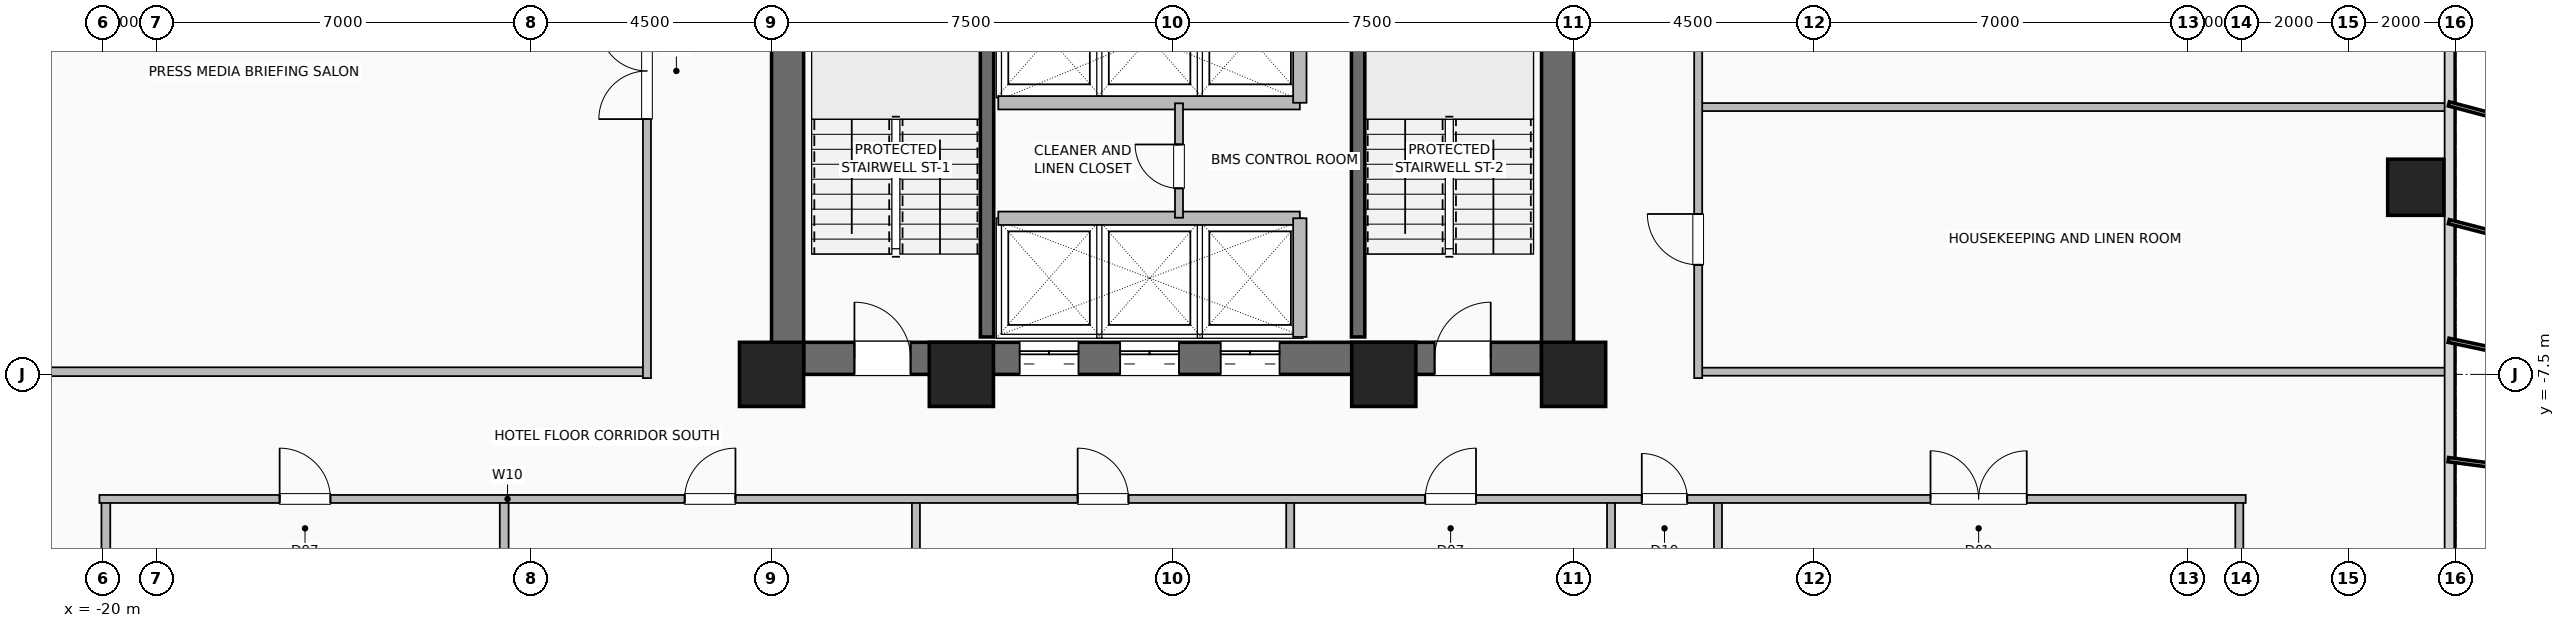
"""IFC4 building model, lengths in metres.
Left out: names, types, materials, properties, quantities, classifications, styles, units other than length and angle.
Written with IfcOpenShell. Run it as: python <this file> out.ifc"""

import sys

from ifc_helpers import new_model, si_unit, direction, frame, frame_2d, origin, origin_2d, place, context, subcontext, project, spatial, rectangle, hollow_rectangle, extrude, element, fill, save


model = new_model("IFC4")
c1 = context("Model", 3, precision=1e-05, world=origin(), true_north=direction((0.0, 1.0)))
c2 = subcontext(c1, "Body", "Model", "MODEL_VIEW")
j1 = project(units=[si_unit("LENGTHUNIT", "METRE"), si_unit("PLANEANGLEUNIT", "RADIAN")], contexts=[c1])
p1 = place(None, origin())
s1 = spatial("IfcSite", under=j1, at=p1, CompositionType="ELEMENT")
p2 = place(p1, origin())
s2 = spatial("IfcBuilding", under=s1, at=p2, CompositionType="ELEMENT")
p3 = place(p2, frame((0.0, 0.0, 37.5)))
s3 = spatial("IfcBuildingStorey", under=s2, at=p3, CompositionType="ELEMENT", Elevation=37.5)
for number, where, z_axis, x_axis in (
    (1, (-7.5, -7.5, 0.0), (0.0, 0.0, 1.0), (1.0, 0.0, 0.0)),
    (2, (-3.95, -7.5, 0.0), (0.0, 0.0, 1.0), (1.0, 0.0, 0.0)),
    (3, (3.95, -7.5, 0.0), (0.0, 0.0, 1.0), (1.0, 0.0, 0.0)),
    (4, (7.5, -7.5, 0.0), (0.0, 0.0, 1.0), (1.0, 0.0, 0.0)),
):
    element("IfcColumn", number, at=place(p3, frame(where, z_axis=z_axis, x_axis=x_axis)), inside=s3, PredefinedType="COLUMN", context=c2, shape_type="SweptSolid", body=[
        extrude(hollow_rectangle(XDim=1.2, YDim=1.2, WallThickness=0.055, at=origin_2d()), origin(), (0.0, 0.0, 1.0), 3.5),
    ])
p4 = place(p3, frame((23.25, -4.0, 0.0), z_axis=(0.0, 0.0, 1.0), x_axis=(1.0, 0.0, 0.0)))
e5 = element("IfcColumn", 5, at=p4, inside=s3, PredefinedType="COLUMN", context=c2, shape_type="SweptSolid", body=[
    extrude(hollow_rectangle(XDim=1.05, YDim=1.05, WallThickness=0.05, at=origin_2d()), origin(), (0.0, 0.0, 1.0), 3.5),
])
p5 = place(p3, frame((-7.5, -7.2, 0.0), z_axis=(0.0, 0.0, 1.0), x_axis=(1.0, 0.0, 0.0)))
e6 = element("IfcWall", 6, at=p5, inside=s3, PredefinedType="SHEAR", context=c2, shape_type="SweptSolid", body=[
    extrude(rectangle(XDim=15.0, YDim=0.6, at=frame_2d((7.5, 0.0))), origin(), (0.0, 0.0, 1.0), 3.25),
])
p6 = place(p5, frame((1.55, 0.0, 0.0)))
e7 = element("IfcOpeningElement", 7, at=p6, cuts=e6, PredefinedType="OPENING", context=c2, shape_type="SweptSolid", body=[
    extrude(rectangle(XDim=1.05, YDim=2.08, at=frame_2d((0.525, 1.04))), frame((0.0, 0.31, 0.0), z_axis=(0.0, -1.0, 0.0), x_axis=(1.0, 0.0, 0.0)), (0.0, 0.0, 1.0), 0.62),
])
p7 = place(p5, frame((12.4, 0.0, 0.0)))
e8 = element("IfcOpeningElement", 8, at=p7, cuts=e6, PredefinedType="OPENING", context=c2, shape_type="SweptSolid", body=[
    extrude(rectangle(XDim=1.05, YDim=2.08, at=frame_2d((0.525, 1.04))), frame((0.0, 0.31, 0.0), z_axis=(0.0, -1.0, 0.0), x_axis=(1.0, 0.0, 0.0)), (0.0, 0.0, 1.0), 0.62),
])
p8 = place(p5, frame((4.64, 0.0, 0.0)))
e9 = element("IfcOpeningElement", 9, at=p8, cuts=e6, PredefinedType="OPENING", context=c2, shape_type="SweptSolid", body=[
    extrude(rectangle(XDim=1.1, YDim=2.2, at=frame_2d((0.55, 1.1))), frame((0.0, 0.31, 0.0), z_axis=(0.0, -1.0, 0.0), x_axis=(1.0, 0.0, 0.0)), (0.0, 0.0, 1.0), 0.62),
])
p9 = place(p5, frame((6.52, 0.0, 0.0)))
e10 = element("IfcOpeningElement", 10, at=p9, cuts=e6, PredefinedType="OPENING", context=c2, shape_type="SweptSolid", body=[
    extrude(rectangle(XDim=1.1, YDim=2.2, at=frame_2d((0.55, 1.1))), frame((0.0, 0.31, 0.0), z_axis=(0.0, -1.0, 0.0), x_axis=(1.0, 0.0, 0.0)), (0.0, 0.0, 1.0), 0.62),
])
p10 = place(p5, frame((8.4, 0.0, 0.0)))
e11 = element("IfcOpeningElement", 11, at=p10, cuts=e6, PredefinedType="OPENING", context=c2, shape_type="SweptSolid", body=[
    extrude(rectangle(XDim=1.1, YDim=2.2, at=frame_2d((0.55, 1.1))), frame((0.0, 0.31, 0.0), z_axis=(0.0, -1.0, 0.0), x_axis=(1.0, 0.0, 0.0)), (0.0, 0.0, 1.0), 0.62),
])
p11 = place(p3, frame((-7.2, -7.5, 0.0), z_axis=(0.0, 0.0, 1.0), x_axis=(0.0, 1.0, 0.0)))
e12 = element("IfcWall", 12, at=p11, inside=s3, PredefinedType="SHEAR", context=c2, shape_type="SweptSolid", body=[
    extrude(rectangle(XDim=15.0, YDim=0.6, at=frame_2d((7.5, 0.0))), origin(), (0.0, 0.0, 1.0), 3.25),
])
p12 = place(p11, frame((9.5, 0.0, 0.0)))
e13 = element("IfcOpeningElement", 13, at=p12, cuts=e12, PredefinedType="OPENING", context=c2, shape_type="SweptSolid", body=[
    extrude(rectangle(XDim=1.0, YDim=2.08, at=frame_2d((0.5, 1.04))), frame((0.0, 0.31, 0.0), z_axis=(0.0, -1.0, 0.0), x_axis=(1.0, 0.0, 0.0)), (0.0, 0.0, 1.0), 0.62),
])
p13 = place(p3, frame((7.2, -7.5, 0.0), z_axis=(0.0, 0.0, 1.0), x_axis=(0.0, 1.0, 0.0)))
e14 = element("IfcWall", 14, at=p13, inside=s3, PredefinedType="SHEAR", context=c2, shape_type="SweptSolid", body=[
    extrude(rectangle(XDim=15.0, YDim=0.6, at=frame_2d((7.5, 0.0))), origin(), (0.0, 0.0, 1.0), 3.25),
])
for number, where, z_axis, x_axis in (
    (15, (-3.47, -6.8, 0.0), (0.0, 0.0, 1.0), (0.0, 1.0, 0.0)),
    (16, (3.47, -6.8, 0.0), (0.0, 0.0, 1.0), (0.0, 1.0, 0.0)),
):
    element("IfcWall", number, at=place(p3, frame(where, z_axis=z_axis, x_axis=x_axis)), inside=s3, PredefinedType="SHEAR", context=c2, shape_type="SweptSolid", body=[
        extrude(rectangle(XDim=7.72, YDim=0.25, at=frame_2d((3.86, 0.0))), origin(), (0.0, 0.0, 1.0), 3.25),
    ])
p14 = place(p3, frame((-3.26, -4.58, 0.0), z_axis=(0.0, 0.0, 1.0), x_axis=(1.0, 0.0, 0.0)))
e17 = element("IfcWall", 17, at=p14, inside=s3, PredefinedType="SHEAR", context=c2, shape_type="SweptSolid", body=[
    extrude(rectangle(XDim=5.64, YDim=0.25, at=frame_2d((2.82, 0.0))), origin(), (0.0, 0.0, 1.0), 3.25),
])
p15 = place(p3, frame((2.38, -6.8, 0.0), z_axis=(0.0, 0.0, 1.0), x_axis=(0.0, 1.0, 0.0)))
e18 = element("IfcWall", 18, at=p15, inside=s3, PredefinedType="SHEAR", context=c2, shape_type="SweptSolid", body=[
    extrude(rectangle(XDim=2.22, YDim=0.25, at=frame_2d((1.11, 0.0))), origin(), (0.0, 0.0, 1.0), 3.25),
])
p16 = place(p3, frame((-3.26, -2.42, 0.0), z_axis=(0.0, 0.0, 1.0), x_axis=(1.0, 0.0, 0.0)))
e19 = element("IfcWall", 19, at=p16, inside=s3, PredefinedType="SHEAR", context=c2, shape_type="SweptSolid", body=[
    extrude(rectangle(XDim=5.64, YDim=0.25, at=frame_2d((2.82, 0.0))), origin(), (0.0, 0.0, 1.0), 3.25),
])
p17 = place(p3, frame((2.38, -2.42, 0.0), z_axis=(0.0, 0.0, 1.0), x_axis=(0.0, 1.0, 0.0)))
e20 = element("IfcWall", 20, at=p17, inside=s3, PredefinedType="SHEAR", context=c2, shape_type="SweptSolid", body=[
    extrude(rectangle(XDim=2.44, YDim=0.25, at=frame_2d((1.22, 0.0))), origin(), (0.0, 0.0, 1.0), 3.25),
])
p18 = place(p3, frame((0.12, -4.57, 0.0), z_axis=(0.0, 0.0, 1.0), x_axis=(0.0, 1.0, 0.0)))
e21 = element("IfcWall", 21, at=p18, inside=s3, PredefinedType="PARTITIONING", context=c2, shape_type="SweptSolid", body=[
    extrude(rectangle(XDim=2.14, YDim=0.15, at=frame_2d((1.07, 0.0))), origin(), (0.0, 0.0, 1.0), 3.25),
])
p19 = place(p18, frame((0.55, 0.0, 0.0)))
e22 = element("IfcOpeningElement", 22, at=p19, cuts=e21, PredefinedType="OPENING", context=c2, shape_type="SweptSolid", body=[
    extrude(rectangle(XDim=0.82, YDim=2.05, at=frame_2d((0.41, 1.025))), frame((0.0, 0.085, 0.0), z_axis=(0.0, -1.0, 0.0), x_axis=(1.0, 0.0, 0.0)), (0.0, 0.0, 1.0), 0.17),
])
for number, where, z_axis, x_axis in (
    (23, (-19.95, -23.82, 0.0), (0.0, 0.0, 1.0), (0.0, 1.0, 0.0)),
    (24, (-12.5, -23.82, 0.0), (0.0, 0.0, 1.0), (0.0, 1.0, 0.0)),
):
    element("IfcWall", number, at=place(p3, frame(where, z_axis=z_axis, x_axis=x_axis)), inside=s3, PredefinedType="PLUMBINGWALL", context=c2, shape_type="SweptSolid", body=[
        extrude(rectangle(XDim=13.99, YDim=0.165, at=frame_2d((6.995, 0.0))), origin(), (0.0, 0.0, 1.0), 3.25),
    ])
for number, where, z_axis, x_axis in (
    (25, (-4.8, -23.82, 0.0), (0.0, 0.0, 1.0), (0.0, 1.0, 0.0)),
    (26, (2.2, -23.82, 0.0), (0.0, 0.0, 1.0), (0.0, 1.0, 0.0)),
    (27, (8.2, -23.82, 0.0), (0.0, 0.0, 1.0), (0.0, 1.0, 0.0)),
    (28, (10.2, -23.82, 0.0), (0.0, 0.0, 1.0), (0.0, 1.0, 0.0)),
    (29, (19.95, -23.82, 0.0), (0.0, 0.0, 1.0), (0.0, 1.0, 0.0)),
):
    element("IfcWall", number, at=place(p3, frame(where, z_axis=z_axis, x_axis=x_axis)), inside=s3, PredefinedType="PARTITIONING", context=c2, shape_type="SweptSolid", body=[
        extrude(rectangle(XDim=13.99, YDim=0.15, at=frame_2d((6.995, 0.0))), origin(), (0.0, 0.0, 1.0), 3.25),
    ])
p20 = place(p3, frame((-20.07, -9.83, 0.0), z_axis=(0.0, 0.0, 1.0), x_axis=(1.0, 0.0, 0.0)))
e30 = element("IfcWall", 30, at=p20, inside=s3, PredefinedType="PARTITIONING", context=c2, shape_type="SweptSolid", body=[
    extrude(rectangle(XDim=40.14, YDim=0.15, at=frame_2d((20.07, 0.0))), origin(), (0.0, 0.0, 1.0), 3.25),
])
p21 = place(p20, frame((3.37, 0.0, 0.0)))
e31 = element("IfcOpeningElement", 31, at=p21, cuts=e30, PredefinedType="OPENING", context=c2, shape_type="SweptSolid", body=[
    extrude(rectangle(XDim=0.95, YDim=2.06, at=frame_2d((0.475, 1.03))), frame((0.0, 0.085, 0.0), z_axis=(0.0, -1.0, 0.0), x_axis=(1.0, 0.0, 0.0)), (0.0, 0.0, 1.0), 0.17),
])
p22 = place(p20, frame((10.945, 0.0, 0.0)))
e32 = element("IfcOpeningElement", 32, at=p22, cuts=e30, PredefinedType="OPENING", context=c2, shape_type="SweptSolid", body=[
    extrude(rectangle(XDim=0.95, YDim=2.06, at=frame_2d((0.475, 1.03))), frame((0.0, 0.085, 0.0), z_axis=(0.0, -1.0, 0.0), x_axis=(1.0, 0.0, 0.0)), (0.0, 0.0, 1.0), 0.17),
])
p23 = place(p20, frame((18.295, 0.0, 0.0)))
e33 = element("IfcOpeningElement", 33, at=p23, cuts=e30, PredefinedType="OPENING", context=c2, shape_type="SweptSolid", body=[
    extrude(rectangle(XDim=0.95, YDim=2.06, at=frame_2d((0.475, 1.03))), frame((0.0, 0.085, 0.0), z_axis=(0.0, -1.0, 0.0), x_axis=(1.0, 0.0, 0.0)), (0.0, 0.0, 1.0), 0.17),
])
p24 = place(p20, frame((24.795, 0.0, 0.0)))
e34 = element("IfcOpeningElement", 34, at=p24, cuts=e30, PredefinedType="OPENING", context=c2, shape_type="SweptSolid", body=[
    extrude(rectangle(XDim=0.95, YDim=2.06, at=frame_2d((0.475, 1.03))), frame((0.0, 0.085, 0.0), z_axis=(0.0, -1.0, 0.0), x_axis=(1.0, 0.0, 0.0)), (0.0, 0.0, 1.0), 0.17),
])
p25 = place(p20, frame((28.845, 0.0, 0.0)))
e35 = element("IfcOpeningElement", 35, at=p25, cuts=e30, PredefinedType="OPENING", context=c2, shape_type="SweptSolid", body=[
    extrude(rectangle(XDim=0.85, YDim=2.05, at=frame_2d((0.425, 1.025))), frame((0.0, 0.085, 0.0), z_axis=(0.0, -1.0, 0.0), x_axis=(1.0, 0.0, 0.0)), (0.0, 0.0, 1.0), 0.17),
])
p26 = place(p20, frame((34.245, 0.0, 0.0)))
e36 = element("IfcOpeningElement", 36, at=p26, cuts=e30, PredefinedType="OPENING", context=c2, shape_type="SweptSolid", body=[
    extrude(rectangle(XDim=1.8, YDim=2.08, at=frame_2d((0.9, 1.04))), frame((0.0, 0.085, 0.0), z_axis=(0.0, -1.0, 0.0), x_axis=(1.0, 0.0, 0.0)), (0.0, 0.0, 1.0), 0.17),
])
p27 = place(p3, frame((-23.82, -7.45, 0.0), z_axis=(0.0, 0.0, 1.0), x_axis=(1.0, 0.0, 0.0)))
e37 = element("IfcWall", 37, at=p27, inside=s3, PredefinedType="PLUMBINGWALL", context=c2, shape_type="SweptSolid", body=[
    extrude(rectangle(XDim=13.99, YDim=0.165, at=frame_2d((6.995, 0.0))), origin(), (0.0, 0.0, 1.0), 3.25),
])
p28 = place(p3, frame((-9.83, -7.57, 0.0), z_axis=(0.0, 0.0, 1.0), x_axis=(0.0, 1.0, 0.0)))
e38 = element("IfcWall", 38, at=p28, inside=s3, PredefinedType="PARTITIONING", context=c2, shape_type="SweptSolid", body=[
    extrude(rectangle(XDim=15.14, YDim=0.15, at=frame_2d((7.57, 0.0))), origin(), (0.0, 0.0, 1.0), 3.25),
])
p29 = place(p28, frame((4.845, 0.0, 0.0)))
e39 = element("IfcOpeningElement", 39, at=p29, cuts=e38, PredefinedType="OPENING", context=c2, shape_type="SweptSolid", body=[
    extrude(rectangle(XDim=1.8, YDim=2.08, at=frame_2d((0.9, 1.04))), frame((0.0, 0.085, 0.0), z_axis=(0.0, -1.0, 0.0), x_axis=(1.0, 0.0, 0.0)), (0.0, 0.0, 1.0), 0.17),
])
p30 = place(p28, frame((11.77, 0.0, 0.0)))
e40 = element("IfcOpeningElement", 40, at=p30, cuts=e38, PredefinedType="OPENING", context=c2, shape_type="SweptSolid", body=[
    extrude(rectangle(XDim=0.85, YDim=2.05, at=frame_2d((0.425, 1.025))), frame((0.0, 0.085, 0.0), z_axis=(0.0, -1.0, 0.0), x_axis=(1.0, 0.0, 0.0)), (0.0, 0.0, 1.0), 0.17),
])
p31 = place(p28, frame((13.545, 0.0, 0.0)))
e41 = element("IfcOpeningElement", 41, at=p31, cuts=e38, PredefinedType="OPENING", context=c2, shape_type="SweptSolid", body=[
    extrude(rectangle(XDim=0.95, YDim=2.06, at=frame_2d((0.475, 1.03))), frame((0.0, 0.085, 0.0), z_axis=(0.0, -1.0, 0.0), x_axis=(1.0, 0.0, 0.0)), (0.0, 0.0, 1.0), 0.17),
])
for number, where, z_axis, x_axis in (
    (42, (9.83, -7.45, 0.0), (0.0, 0.0, 1.0), (1.0, 0.0, 0.0)),
    (43, (9.83, -2.5, 0.0), (0.0, 0.0, 1.0), (1.0, 0.0, 0.0)),
):
    element("IfcWall", number, at=place(p3, frame(where, z_axis=z_axis, x_axis=x_axis)), inside=s3, PredefinedType="PARTITIONING", context=c2, shape_type="SweptSolid", body=[
        extrude(rectangle(XDim=13.99, YDim=0.15, at=frame_2d((6.995, 0.0))), origin(), (0.0, 0.0, 1.0), 3.25),
    ])
p32 = place(p3, frame((9.83, -7.57, 0.0), z_axis=(0.0, 0.0, 1.0), x_axis=(0.0, 1.0, 0.0)))
e44 = element("IfcWall", 44, at=p32, inside=s3, PredefinedType="PARTITIONING", context=c2, shape_type="SweptSolid", body=[
    extrude(rectangle(XDim=15.14, YDim=0.15, at=frame_2d((7.57, 0.0))), origin(), (0.0, 0.0, 1.0), 3.25),
])
p33 = place(p32, frame((2.12, 0.0, 0.0)))
e45 = element("IfcOpeningElement", 45, at=p33, cuts=e44, PredefinedType="OPENING", context=c2, shape_type="SweptSolid", body=[
    extrude(rectangle(XDim=0.95, YDim=2.06, at=frame_2d((0.475, 1.03))), frame((0.0, 0.085, 0.0), z_axis=(0.0, -1.0, 0.0), x_axis=(1.0, 0.0, 0.0)), (0.0, 0.0, 1.0), 0.17),
])
p34 = place(p32, frame((7.095, 0.0, 0.0)))
e46 = element("IfcOpeningElement", 46, at=p34, cuts=e44, PredefinedType="OPENING", context=c2, shape_type="SweptSolid", body=[
    extrude(rectangle(XDim=0.95, YDim=2.06, at=frame_2d((0.475, 1.03))), frame((0.0, 0.085, 0.0), z_axis=(0.0, -1.0, 0.0), x_axis=(1.0, 0.0, 0.0)), (0.0, 0.0, 1.0), 0.17),
])
p35 = place(p32, frame((12.07, 0.0, 0.0)))
e47 = element("IfcOpeningElement", 47, at=p35, cuts=e44, PredefinedType="OPENING", context=c2, shape_type="SweptSolid", body=[
    extrude(rectangle(XDim=0.95, YDim=2.06, at=frame_2d((0.475, 1.03))), frame((0.0, 0.085, 0.0), z_axis=(0.0, -1.0, 0.0), x_axis=(1.0, 0.0, 0.0)), (0.0, 0.0, 1.0), 0.17),
])
p36 = place(p6, origin())
e48 = element("IfcDoor", 48, at=p36, inside=s3, OperationType="SINGLE_SWING_LEFT", PredefinedType="DOOR", context=c2, shape_type="SweptSolid", body=[
    extrude(rectangle(XDim=1.05, YDim=2.08, at=frame_2d((0.525, 1.04))), frame((0.0, 0.025, 0.0), z_axis=(0.0, -1.0, 0.0), x_axis=(1.0, 0.0, 0.0)), (0.0, 0.0, 1.0), 0.05),
])
fill(e7, e48)
p37 = place(p7, origin())
e49 = element("IfcDoor", 49, at=p37, inside=s3, OperationType="SINGLE_SWING_RIGHT", PredefinedType="DOOR", context=c2, shape_type="SweptSolid", body=[
    extrude(rectangle(XDim=1.05, YDim=2.08, at=frame_2d((0.525, 1.04))), frame((0.0, 0.025, 0.0), z_axis=(0.0, -1.0, 0.0), x_axis=(1.0, 0.0, 0.0)), (0.0, 0.0, 1.0), 0.05),
])
fill(e8, e49)
p38 = place(p8, origin())
e50 = element("IfcDoor", 50, at=p38, inside=s3, OperationType="DOUBLE_DOOR_SLIDING", PredefinedType="DOOR", context=c2, shape_type="SweptSolid", body=[
    extrude(rectangle(XDim=1.1, YDim=2.2, at=frame_2d((0.55, 1.1))), frame((0.0, 0.025, 0.0), z_axis=(0.0, -1.0, 0.0), x_axis=(1.0, 0.0, 0.0)), (0.0, 0.0, 1.0), 0.05),
])
fill(e9, e50)
p39 = place(p9, origin())
e51 = element("IfcDoor", 51, at=p39, inside=s3, OperationType="DOUBLE_DOOR_SLIDING", PredefinedType="DOOR", context=c2, shape_type="SweptSolid", body=[
    extrude(rectangle(XDim=1.1, YDim=2.2, at=frame_2d((0.55, 1.1))), frame((0.0, 0.025, 0.0), z_axis=(0.0, -1.0, 0.0), x_axis=(1.0, 0.0, 0.0)), (0.0, 0.0, 1.0), 0.05),
])
fill(e10, e51)
p40 = place(p10, origin())
e52 = element("IfcDoor", 52, at=p40, inside=s3, OperationType="DOUBLE_DOOR_SLIDING", PredefinedType="DOOR", context=c2, shape_type="SweptSolid", body=[
    extrude(rectangle(XDim=1.1, YDim=2.2, at=frame_2d((0.55, 1.1))), frame((0.0, 0.025, 0.0), z_axis=(0.0, -1.0, 0.0), x_axis=(1.0, 0.0, 0.0)), (0.0, 0.0, 1.0), 0.05),
])
fill(e11, e52)
p41 = place(p19, origin())
e53 = element("IfcDoor", 53, at=p41, inside=s3, OperationType="SINGLE_SWING_RIGHT", PredefinedType="DOOR", context=c2, shape_type="SweptSolid", body=[
    extrude(rectangle(XDim=0.82, YDim=2.05, at=frame_2d((0.41, 1.025))), frame((0.0, 0.025, 0.0), z_axis=(0.0, -1.0, 0.0), x_axis=(1.0, 0.0, 0.0)), (0.0, 0.0, 1.0), 0.05),
])
fill(e22, e53)
p42 = place(p21, origin())
e54 = element("IfcDoor", 54, at=p42, inside=s3, OperationType="SINGLE_SWING_LEFT", PredefinedType="DOOR", context=c2, shape_type="SweptSolid", body=[
    extrude(rectangle(XDim=0.95, YDim=2.06, at=frame_2d((0.475, 1.03))), frame((0.0, 0.025, 0.0), z_axis=(0.0, -1.0, 0.0), x_axis=(1.0, 0.0, 0.0)), (0.0, 0.0, 1.0), 0.05),
])
fill(e31, e54)
p43 = place(p22, origin())
e55 = element("IfcDoor", 55, at=p43, inside=s3, OperationType="SINGLE_SWING_RIGHT", PredefinedType="DOOR", context=c2, shape_type="SweptSolid", body=[
    extrude(rectangle(XDim=0.95, YDim=2.06, at=frame_2d((0.475, 1.03))), frame((0.0, 0.025, 0.0), z_axis=(0.0, -1.0, 0.0), x_axis=(1.0, 0.0, 0.0)), (0.0, 0.0, 1.0), 0.05),
])
fill(e32, e55)
p44 = place(p23, origin())
e56 = element("IfcDoor", 56, at=p44, inside=s3, OperationType="SINGLE_SWING_LEFT", PredefinedType="DOOR", context=c2, shape_type="SweptSolid", body=[
    extrude(rectangle(XDim=0.95, YDim=2.06, at=frame_2d((0.475, 1.03))), frame((0.0, 0.025, 0.0), z_axis=(0.0, -1.0, 0.0), x_axis=(1.0, 0.0, 0.0)), (0.0, 0.0, 1.0), 0.05),
])
fill(e33, e56)
p45 = place(p24, origin())
e57 = element("IfcDoor", 57, at=p45, inside=s3, OperationType="SINGLE_SWING_RIGHT", PredefinedType="DOOR", context=c2, shape_type="SweptSolid", body=[
    extrude(rectangle(XDim=0.95, YDim=2.06, at=frame_2d((0.475, 1.03))), frame((0.0, 0.025, 0.0), z_axis=(0.0, -1.0, 0.0), x_axis=(1.0, 0.0, 0.0)), (0.0, 0.0, 1.0), 0.05),
])
fill(e34, e57)
p46 = place(p25, origin())
e58 = element("IfcDoor", 58, at=p46, inside=s3, OperationType="SINGLE_SWING_LEFT", PredefinedType="DOOR", context=c2, shape_type="SweptSolid", body=[
    extrude(rectangle(XDim=0.85, YDim=2.05, at=frame_2d((0.425, 1.025))), frame((0.0, 0.025, 0.0), z_axis=(0.0, -1.0, 0.0), x_axis=(1.0, 0.0, 0.0)), (0.0, 0.0, 1.0), 0.05),
])
fill(e35, e58)
p47 = place(p26, origin())
e59 = element("IfcDoor", 59, at=p47, inside=s3, OperationType="DOUBLE_DOOR_SINGLE_SWING", PredefinedType="DOOR", context=c2, shape_type="SweptSolid", body=[
    extrude(rectangle(XDim=1.8, YDim=2.08, at=frame_2d((0.9, 1.04))), frame((0.0, 0.025, 0.0), z_axis=(0.0, -1.0, 0.0), x_axis=(1.0, 0.0, 0.0)), (0.0, 0.0, 1.0), 0.05),
])
fill(e36, e59)
p48 = place(p29, origin())
e60 = element("IfcDoor", 60, at=p48, inside=s3, OperationType="DOUBLE_DOOR_SINGLE_SWING", PredefinedType="DOOR", context=c2, shape_type="SweptSolid", body=[
    extrude(rectangle(XDim=1.8, YDim=2.08, at=frame_2d((0.9, 1.04))), frame((0.0, 0.025, 0.0), z_axis=(0.0, -1.0, 0.0), x_axis=(1.0, 0.0, 0.0)), (0.0, 0.0, 1.0), 0.05),
])
fill(e39, e60)
p49 = place(p33, origin())
e61 = element("IfcDoor", 61, at=p49, inside=s3, OperationType="SINGLE_SWING_RIGHT", PredefinedType="DOOR", context=c2, shape_type="SweptSolid", body=[
    extrude(rectangle(XDim=0.95, YDim=2.06, at=frame_2d((0.475, 1.03))), frame((0.0, 0.025, 0.0), z_axis=(0.0, -1.0, 0.0), x_axis=(1.0, 0.0, 0.0)), (0.0, 0.0, 1.0), 0.05),
])
fill(e45, e61)
save(model, sys.argv[1])
